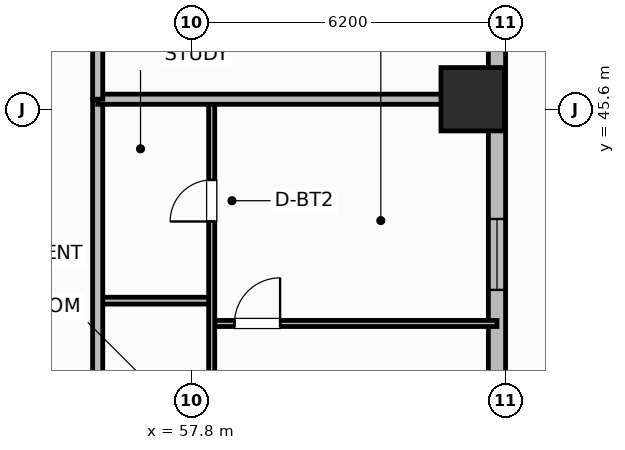
"""IFC4 building model, lengths in metres.
Left out: names, types, materials, properties, quantities, classifications, styles, units other than length and angle.
Written with IfcOpenShell. Run it as: python <this file> out.ifc"""

import sys

from ifc_helpers import new_model, si_unit, direction, frame, frame_2d, origin, origin_2d, place, context, subcontext, project, spatial, rectangle, extrude, element, fill, save


model = new_model("IFC4")
c1 = context("Model", 3, precision=1e-05, world=origin(), true_north=direction((0.0, 1.0)))
c2 = subcontext(c1, "Body", "Model", "MODEL_VIEW")
j1 = project(units=[si_unit("LENGTHUNIT", "METRE"), si_unit("PLANEANGLEUNIT", "RADIAN")], contexts=[c1])
p1 = place(None, origin())
s1 = spatial("IfcSite", under=j1, at=p1, CompositionType="ELEMENT")
p2 = place(p1, origin())
s2 = spatial("IfcBuilding", under=s1, at=p2, CompositionType="ELEMENT")
p3 = place(p2, frame((0.0, 0.0, 24.6)))
s3 = spatial("IfcBuildingStorey", under=s2, at=p3, CompositionType="ELEMENT", Elevation=24.6)
p4 = place(p3, frame((63.35, 45.8, 0.0), z_axis=(0.0, 0.0, 1.0), x_axis=(1.0, 0.0, 0.0)))
e1 = element("IfcColumn", 1, at=p4, inside=s3, PredefinedType="COLUMN", context=c2, shape_type="SweptSolid", body=[
    extrude(rectangle(XDim=1.25, YDim=1.25, at=origin_2d()), origin(), (0.0, 0.0, 1.0), 4.2),
])
p5 = place(p3, frame((63.83, 32.6, 0.0), z_axis=(0.0, 0.0, 1.0), x_axis=(0.0, 1.0, 0.0)))
e2 = element("IfcWall", 2, at=p5, inside=s3, PredefinedType="SOLIDWALL", context=c2, shape_type="SweptSolid", body=[
    extrude(rectangle(XDim=14.8, YDim=0.34, at=frame_2d((7.4, 0.0))), origin(), (0.0, 0.0, 1.0), 3.2),
])
p6 = place(p5, frame((1.637, 0.0, 0.85)))
e3 = element("IfcOpeningElement", 3, at=p6, cuts=e2, PredefinedType="OPENING", context=c2, shape_type="SweptSolid", body=[
    extrude(rectangle(XDim=1.4, YDim=1.85, at=frame_2d((0.7, 0.925))), frame((0.0, 0.18, 0.0), z_axis=(0.0, -1.0, 0.0), x_axis=(1.0, 0.0, 0.0)), (0.0, 0.0, 1.0), 0.36),
])
p7 = place(p5, frame((4.92, 0.0, 0.85)))
e4 = element("IfcOpeningElement", 4, at=p7, cuts=e2, PredefinedType="OPENING", context=c2, shape_type="SweptSolid", body=[
    extrude(rectangle(XDim=1.4, YDim=1.85, at=frame_2d((0.7, 0.925))), frame((0.0, 0.18, 0.0), z_axis=(0.0, -1.0, 0.0), x_axis=(1.0, 0.0, 0.0)), (0.0, 0.0, 1.0), 0.36),
])
p8 = place(p5, frame((9.438, 0.0, 0.85)))
e5 = element("IfcOpeningElement", 5, at=p8, cuts=e2, PredefinedType="OPENING", context=c2, shape_type="SweptSolid", body=[
    extrude(rectangle(XDim=1.4, YDim=1.85, at=frame_2d((0.7, 0.925))), frame((0.0, 0.18, 0.0), z_axis=(0.0, -1.0, 0.0), x_axis=(1.0, 0.0, 0.0)), (0.0, 0.0, 1.0), 0.36),
])
p9 = place(p3, frame((55.95, 41.825, 0.0), z_axis=(0.0, 0.0, 1.0), x_axis=(1.0, 0.0, 0.0)))
e6 = element("IfcWall", 6, at=p9, inside=s3, PredefinedType="PARTITIONING", context=c2, shape_type="SweptSolid", body=[
    extrude(rectangle(XDim=2.25, YDim=0.135, at=frame_2d((1.125, 0.0))), origin(), (0.0, 0.0, 1.0), 3.03),
])
p10 = place(p3, frame((58.2, 41.375, 0.0), z_axis=(0.0, 0.0, 1.0), x_axis=(1.0, 0.0, 0.0)))
e7 = element("IfcWall", 7, at=p10, inside=s3, PredefinedType="PARTITIONING", context=c2, shape_type="SweptSolid", body=[
    extrude(rectangle(XDim=5.63, YDim=0.12, at=frame_2d((2.815, 0.0))), origin(), (0.0, 0.0, 1.0), 3.03),
])
p11 = place(p10, frame((0.45, 0.0, 0.0)))
e8 = element("IfcOpeningElement", 8, at=p11, cuts=e7, PredefinedType="OPENING", context=c2, shape_type="SweptSolid", body=[
    extrude(rectangle(XDim=0.9, YDim=2.1, at=frame_2d((0.45, 1.05))), frame((0.0, 0.07, 0.0), z_axis=(0.0, -1.0, 0.0), x_axis=(1.0, 0.0, 0.0)), (0.0, 0.0, 1.0), 0.14),
])
p12 = place(p3, frame((58.2, 32.665, 0.0), z_axis=(0.0, 0.0, 1.0), x_axis=(0.0, 1.0, 0.0)))
e9 = element("IfcWall", 9, at=p12, inside=s3, PredefinedType="PARTITIONING", context=c2, shape_type="SweptSolid", body=[
    extrude(rectangle(XDim=13.095, YDim=0.12, at=frame_2d((6.547, 0.0))), origin(), (0.0, 0.0, 1.0), 3.03),
])
p13 = place(p12, frame((0.41, 0.0, 0.0)))
e10 = element("IfcOpeningElement", 10, at=p13, cuts=e9, PredefinedType="OPENING", context=c2, shape_type="SweptSolid", body=[
    extrude(rectangle(XDim=0.9, YDim=2.1, at=frame_2d((0.45, 1.05))), frame((0.0, 0.07, 0.0), z_axis=(0.0, -1.0, 0.0), x_axis=(1.0, 0.0, 0.0)), (0.0, 0.0, 1.0), 0.14),
])
p14 = place(p12, frame((10.722, 0.0, 0.0)))
e11 = element("IfcOpeningElement", 11, at=p14, cuts=e9, PredefinedType="OPENING", context=c2, shape_type="SweptSolid", body=[
    extrude(rectangle(XDim=0.82, YDim=2.08, at=frame_2d((0.41, 1.04))), frame((0.0, 0.07, 0.0), z_axis=(0.0, -1.0, 0.0), x_axis=(1.0, 0.0, 0.0)), (0.0, 0.0, 1.0), 0.14),
])
p15 = place(p3, frame((55.95, 19.45, 0.0), z_axis=(0.0, 0.0, 1.0), x_axis=(0.0, 1.0, 0.0)))
e12 = element("IfcWall", 12, at=p15, inside=s3, PredefinedType="PARTITIONING", context=c2, shape_type="SweptSolid", body=[
    extrude(rectangle(XDim=26.35, YDim=0.2, at=frame_2d((13.175, 0.0))), origin(), (0.0, 0.0, 1.0), 3.03),
])
p16 = place(p15, frame((2.5, 0.0, 0.0)))
e13 = element("IfcOpeningElement", 13, at=p16, cuts=e12, PredefinedType="OPENING", context=c2, shape_type="SweptSolid", body=[
    extrude(rectangle(XDim=1.0, YDim=2.15, at=frame_2d((0.5, 1.075))), frame((0.0, 0.11, 0.0), z_axis=(0.0, -1.0, 0.0), x_axis=(1.0, 0.0, 0.0)), (0.0, 0.0, 1.0), 0.22),
])
p17 = place(p15, frame((13.875, 0.0, 0.0)))
e14 = element("IfcOpeningElement", 14, at=p17, cuts=e12, PredefinedType="OPENING", context=c2, shape_type="SweptSolid", body=[
    extrude(rectangle(XDim=1.0, YDim=2.15, at=frame_2d((0.5, 1.075))), frame((0.0, 0.11, 0.0), z_axis=(0.0, -1.0, 0.0), x_axis=(1.0, 0.0, 0.0)), (0.0, 0.0, 1.0), 0.22),
])
p18 = place(p3, frame((55.95, 45.8, 0.0), z_axis=(0.0, 0.0, 1.0), x_axis=(1.0, 0.0, 0.0)))
e15 = element("IfcWall", 15, at=p18, inside=s3, PredefinedType="PARTITIONING", context=c2, shape_type="SweptSolid", body=[
    extrude(rectangle(XDim=7.46, YDim=0.2, at=frame_2d((3.73, 0.0))), origin(), (0.0, 0.0, 1.0), 3.03),
])
p19 = place(p3, frame((55.95, 45.8, 0.0), z_axis=(0.0, 0.0, 1.0), x_axis=(0.0, 1.0, 0.0)))
e16 = element("IfcWall", 16, at=p19, inside=s3, PredefinedType="PARTITIONING", context=c2, shape_type="SweptSolid", body=[
    extrude(rectangle(XDim=5.63, YDim=0.2, at=frame_2d((2.815, 0.0))), origin(), (0.0, 0.0, 1.0), 3.03),
])
p20 = place(p8, origin())
e17 = element("IfcWindow", 17, at=p20, inside=s3, PartitioningType="SINGLE_PANEL", PredefinedType="WINDOW", context=c2, shape_type="SweptSolid", body=[
    extrude(rectangle(XDim=1.4, YDim=1.85, at=frame_2d((0.7, 0.925))), frame((0.0, 0.03, 0.0), z_axis=(0.0, -1.0, 0.0), x_axis=(1.0, 0.0, 0.0)), (0.0, 0.0, 1.0), 0.06),
])
fill(e5, e17)
p21 = place(p11, origin())
e18 = element("IfcDoor", 18, at=p21, inside=s3, OperationType="SINGLE_SWING_RIGHT", PredefinedType="DOOR", context=c2, shape_type="SweptSolid", body=[
    extrude(rectangle(XDim=0.9, YDim=2.1, at=frame_2d((0.45, 1.05))), frame((0.0, 0.025, 0.0), z_axis=(0.0, -1.0, 0.0), x_axis=(1.0, 0.0, 0.0)), (0.0, 0.0, 1.0), 0.05),
])
fill(e8, e18)
p22 = place(p14, origin())
e19 = element("IfcDoor", 19, at=p22, inside=s3, OperationType="SINGLE_SWING_LEFT", PredefinedType="DOOR", context=c2, shape_type="SweptSolid", body=[
    extrude(rectangle(XDim=0.82, YDim=2.08, at=frame_2d((0.41, 1.04))), frame((0.0, 0.025, 0.0), z_axis=(0.0, -1.0, 0.0), x_axis=(1.0, 0.0, 0.0)), (0.0, 0.0, 1.0), 0.05),
])
fill(e11, e19)
save(model, sys.argv[1])
